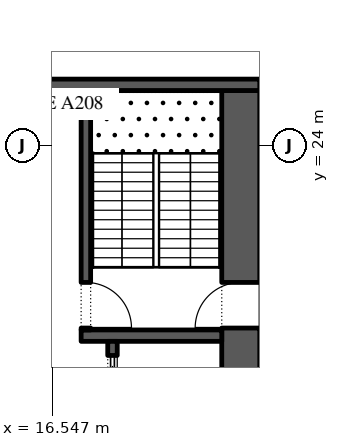
"""IFC4 building model, lengths in metres.
Left out: names, types, materials, properties, quantities, classifications, styles, units other than length and angle.
Written with IfcOpenShell. Run it as: python <this file> out.ifc"""

import sys

from ifc_helpers import new_model, si_unit, direction, frame, frame_2d, origin, place, context, subcontext, project, spatial, rectangle, extrude, element, fill, save


model = new_model("IFC4")
c1 = context("Model", 3, precision=1e-05, world=origin(), true_north=direction((0.0, 1.0)))
c2 = subcontext(c1, "Body", "Model", "MODEL_VIEW")
j1 = project(units=[si_unit("LENGTHUNIT", "METRE"), si_unit("PLANEANGLEUNIT", "RADIAN")], contexts=[c1])
p1 = place(None, origin())
s1 = spatial("IfcSite", under=j1, at=p1, CompositionType="ELEMENT")
p2 = place(p1, origin())
s2 = spatial("IfcBuilding", under=s1, at=p2, CompositionType="ELEMENT")
p3 = place(p2, frame((0.0, 0.0, 28.8)))
s3 = spatial("IfcBuildingStorey", under=s2, at=p3, CompositionType="ELEMENT", Elevation=28.8)
p4 = place(p3, frame((21.5, -2.45, 0.0), z_axis=(0.0, 0.0, 1.0), x_axis=(0.0, 1.0, 0.0)))
e1 = element("IfcWall", 1, at=p4, inside=s3, PredefinedType="SHEAR", context=c2, shape_type="SweptSolid", body=[
    extrude(rectangle(XDim=27.9, YDim=1.0, at=frame_2d((13.95, 0.0))), origin(), (0.0, 0.0, 1.0), 4.35),
])
p5 = place(p4, frame((5.05, 0.0, 0.0)))
e2 = element("IfcOpeningElement", 2, at=p5, cuts=e1, PredefinedType="OPENING", context=c2, shape_type="SweptSolid", body=[
    extrude(rectangle(XDim=1.2, YDim=2.1, at=frame_2d((0.6, 1.05))), frame((0.0, 0.51, 0.0), z_axis=(0.0, -1.0, 0.0), x_axis=(1.0, 0.0, 0.0)), (0.0, 0.0, 1.0), 1.02),
])
p6 = place(p4, frame((21.65, 0.0, 0.0)))
e3 = element("IfcOpeningElement", 3, at=p6, cuts=e1, PredefinedType="OPENING", context=c2, shape_type="SweptSolid", body=[
    extrude(rectangle(XDim=1.2, YDim=2.1, at=frame_2d((0.6, 1.05))), frame((0.0, 0.51, 0.0), z_axis=(0.0, -1.0, 0.0), x_axis=(1.0, 0.0, 0.0)), (0.0, 0.0, 1.0), 1.02),
])
p7 = place(p3, frame((10.0, 25.6, 0.0), z_axis=(0.0, 0.0, 1.0), x_axis=(1.0, 0.0, 0.0)))
e4 = element("IfcWall", 4, at=p7, inside=s3, PredefinedType="SHEAR", context=c2, shape_type="SweptSolid", body=[
    extrude(rectangle(XDim=12.0, YDim=0.3, at=frame_2d((6.0, 0.0))), origin(), (0.0, 0.0, 1.0), 4.35),
])
p8 = place(p3, frame((17.3, 19.0, 0.0), z_axis=(0.0, 0.0, 1.0), x_axis=(1.0, 0.0, 0.0)))
e5 = element("IfcWall", 5, at=p8, inside=s3, PredefinedType="SHEAR", context=c2, shape_type="SweptSolid", body=[
    extrude(rectangle(XDim=3.7, YDim=0.3, at=frame_2d((1.85, 0.0))), origin(), (0.0, 0.0, 1.0), 4.35),
])
p9 = place(p3, frame((17.425, 19.15, 0.0), z_axis=(0.0, 0.0, 1.0), x_axis=(0.0, 1.0, 0.0)))
e6 = element("IfcWall", 6, at=p9, inside=s3, PredefinedType="SHEAR", context=c2, shape_type="SweptSolid", body=[
    extrude(rectangle(XDim=6.3, YDim=0.25, at=frame_2d((3.15, 0.0))), origin(), (0.0, 0.0, 1.0), 4.35),
])
p10 = place(p9, frame((0.05, 0.0, 0.0)))
e7 = element("IfcOpeningElement", 7, at=p10, cuts=e6, PredefinedType="OPENING", context=c2, shape_type="SweptSolid", body=[
    extrude(rectangle(XDim=1.2, YDim=2.1, at=frame_2d((0.6, 1.05))), frame((0.0, 0.135, 0.0), z_axis=(0.0, -1.0, 0.0), x_axis=(1.0, 0.0, 0.0)), (0.0, 0.0, 1.0), 0.27),
])
p11 = place(p3, frame((18.125, 4.15, 0.0), z_axis=(0.0, 0.0, 1.0), x_axis=(0.0, 1.0, 0.0)))
e8 = element("IfcWall", 8, at=p11, inside=s3, PredefinedType="SHEAR", context=c2, shape_type="SweptSolid", body=[
    extrude(rectangle(XDim=14.7, YDim=0.25, at=frame_2d((7.35, 0.0))), origin(), (0.0, 0.0, 1.0), 4.35),
])
p12 = place(p11, frame((0.371, 0.0, 0.0)))
e9 = element("IfcOpeningElement", 9, at=p12, cuts=e8, PredefinedType="OPENING", context=c2, shape_type="SweptSolid", body=[
    extrude(rectangle(XDim=1.1, YDim=2.1, at=frame_2d((0.55, 1.05))), frame((0.0, 0.135, 0.0), z_axis=(0.0, -1.0, 0.0), x_axis=(1.0, 0.0, 0.0)), (0.0, 0.0, 1.0), 0.27),
])
p13 = place(p11, frame((2.514, 0.0, 0.0)))
e10 = element("IfcOpeningElement", 10, at=p13, cuts=e8, PredefinedType="OPENING", context=c2, shape_type="SweptSolid", body=[
    extrude(rectangle(XDim=1.1, YDim=2.1, at=frame_2d((0.55, 1.05))), frame((0.0, 0.135, 0.0), z_axis=(0.0, -1.0, 0.0), x_axis=(1.0, 0.0, 0.0)), (0.0, 0.0, 1.0), 0.27),
])
p14 = place(p11, frame((4.657, 0.0, 0.0)))
e11 = element("IfcOpeningElement", 11, at=p14, cuts=e8, PredefinedType="OPENING", context=c2, shape_type="SweptSolid", body=[
    extrude(rectangle(XDim=1.1, YDim=2.1, at=frame_2d((0.55, 1.05))), frame((0.0, 0.135, 0.0), z_axis=(0.0, -1.0, 0.0), x_axis=(1.0, 0.0, 0.0)), (0.0, 0.0, 1.0), 0.27),
])
p15 = place(p11, frame((6.8, 0.0, 0.0)))
e12 = element("IfcOpeningElement", 12, at=p15, cuts=e8, PredefinedType="OPENING", context=c2, shape_type="SweptSolid", body=[
    extrude(rectangle(XDim=1.1, YDim=2.1, at=frame_2d((0.55, 1.05))), frame((0.0, 0.135, 0.0), z_axis=(0.0, -1.0, 0.0), x_axis=(1.0, 0.0, 0.0)), (0.0, 0.0, 1.0), 0.27),
])
p16 = place(p11, frame((8.943, 0.0, 0.0)))
e13 = element("IfcOpeningElement", 13, at=p16, cuts=e8, PredefinedType="OPENING", context=c2, shape_type="SweptSolid", body=[
    extrude(rectangle(XDim=1.1, YDim=2.1, at=frame_2d((0.55, 1.05))), frame((0.0, 0.135, 0.0), z_axis=(0.0, -1.0, 0.0), x_axis=(1.0, 0.0, 0.0)), (0.0, 0.0, 1.0), 0.27),
])
p17 = place(p11, frame((11.086, 0.0, 0.0)))
e14 = element("IfcOpeningElement", 14, at=p17, cuts=e8, PredefinedType="OPENING", context=c2, shape_type="SweptSolid", body=[
    extrude(rectangle(XDim=1.1, YDim=2.1, at=frame_2d((0.55, 1.05))), frame((0.0, 0.135, 0.0), z_axis=(0.0, -1.0, 0.0), x_axis=(1.0, 0.0, 0.0)), (0.0, 0.0, 1.0), 0.27),
])
p18 = place(p11, frame((13.229, 0.0, 0.0)))
e15 = element("IfcOpeningElement", 15, at=p18, cuts=e8, PredefinedType="OPENING", context=c2, shape_type="SweptSolid", body=[
    extrude(rectangle(XDim=1.1, YDim=2.1, at=frame_2d((0.55, 1.05))), frame((0.0, 0.135, 0.0), z_axis=(0.0, -1.0, 0.0), x_axis=(1.0, 0.0, 0.0)), (0.0, 0.0, 1.0), 0.27),
])
p19 = place(p18, origin())
e16 = element("IfcDoor", 16, at=p19, inside=s3, OperationType="SLIDING_TO_LEFT", PredefinedType="DOOR", context=c2, shape_type="SweptSolid", body=[
    extrude(rectangle(XDim=1.1, YDim=2.1, at=frame_2d((0.55, 1.05))), frame((0.0, 0.025, 0.0), z_axis=(0.0, -1.0, 0.0), x_axis=(1.0, 0.0, 0.0)), (0.0, 0.0, 1.0), 0.05),
])
fill(e15, e16)
p20 = place(p10, frame((1.2, 0.0, 0.0), z_axis=(0.0, 0.0, 1.0), x_axis=(-1.0, 0.0, 0.0)))
e17 = element("IfcDoor", 17, at=p20, inside=s3, OperationType="SINGLE_SWING_LEFT", PredefinedType="DOOR", context=c2, shape_type="SweptSolid", body=[
    extrude(rectangle(XDim=1.2, YDim=2.1, at=frame_2d((0.6, 1.05))), frame((0.0, 0.025, 0.0), z_axis=(0.0, -1.0, 0.0), x_axis=(1.0, 0.0, 0.0)), (0.0, 0.0, 1.0), 0.05),
])
fill(e7, e17)
p21 = place(p6, origin())
e18 = element("IfcDoor", 18, at=p21, inside=s3, OperationType="SINGLE_SWING_RIGHT", PredefinedType="DOOR", context=c2, shape_type="SweptSolid", body=[
    extrude(rectangle(XDim=1.2, YDim=2.1, at=frame_2d((0.6, 1.05))), frame((0.0, 0.025, 0.0), z_axis=(0.0, -1.0, 0.0), x_axis=(1.0, 0.0, 0.0)), (0.0, 0.0, 1.0), 0.05),
])
fill(e3, e18)
save(model, sys.argv[1])
